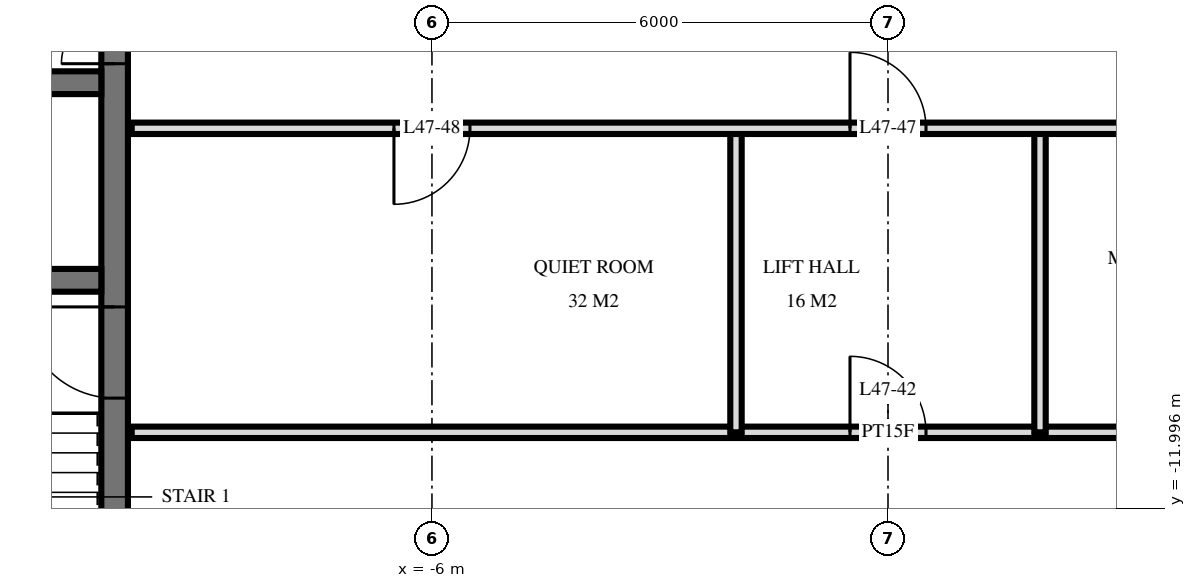
"""IFC4 building model, lengths in metres.
Left out: names, types, materials, properties, quantities, classifications, styles, units other than length and angle.
Written with IfcOpenShell. Run it as: python <this file> out.ifc"""

import sys

from ifc_helpers import new_model, si_unit, direction, frame, frame_2d, origin, place, context, subcontext, project, spatial, rectangle, extrude, element, fill, save


model = new_model("IFC4")
c1 = context("Model", 3, precision=1e-05, world=origin(), true_north=direction((0.0, 1.0)))
c2 = subcontext(c1, "Body", "Model", "MODEL_VIEW")
j1 = project(units=[si_unit("LENGTHUNIT", "METRE"), si_unit("PLANEANGLEUNIT", "RADIAN")], contexts=[c1])
p1 = place(None, origin())
s1 = spatial("IfcSite", under=j1, at=p1, CompositionType="ELEMENT")
p2 = place(p1, origin())
s2 = spatial("IfcBuilding", under=s1, at=p2, CompositionType="ELEMENT")
p3 = place(p2, frame((0.0, 0.0, 183.6)))
s3 = spatial("IfcBuildingStorey", under=s2, at=p3, CompositionType="ELEMENT", Elevation=183.6)
p4 = place(p3, frame((-10.175, -14.55, 0.0), z_axis=(0.0, 0.0, 1.0), x_axis=(0.0, 1.0, 0.0)))
e1 = element("IfcWall", 1, at=p4, inside=s3, PredefinedType="SHEAR", context=c2, shape_type="SweptSolid", body=[
    extrude(rectangle(XDim=14.1, YDim=0.35, at=frame_2d((7.05, 0.0))), origin(), (0.0, 0.0, 1.0), 3.5),
])
p5 = place(p4, frame((8.4, 0.0, 0.0)))
e2 = element("IfcOpeningElement", 2, at=p5, cuts=e1, PredefinedType="OPENING", context=c2, shape_type="SweptSolid", body=[
    extrude(rectangle(XDim=1.4, YDim=2.4, at=frame_2d((0.7, 1.2))), frame((0.0, 0.185, 0.0), z_axis=(0.0, -1.0, 0.0), x_axis=(1.0, 0.0, 0.0)), (0.0, 0.0, 1.0), 0.37),
])
p6 = place(p4, frame((10.0, 0.0, 0.0)))
e3 = element("IfcOpeningElement", 3, at=p6, cuts=e1, PredefinedType="OPENING", context=c2, shape_type="SweptSolid", body=[
    extrude(rectangle(XDim=1.4, YDim=2.4, at=frame_2d((0.7, 1.2))), frame((0.0, 0.185, 0.0), z_axis=(0.0, -1.0, 0.0), x_axis=(1.0, 0.0, 0.0)), (0.0, 0.0, 1.0), 0.37),
])
p7 = place(p4, frame((4.0, 0.0, 0.0)))
e4 = element("IfcOpeningElement", 4, at=p7, cuts=e1, PredefinedType="OPENING", context=c2, shape_type="SweptSolid", body=[
    extrude(rectangle(XDim=1.2, YDim=2.1, at=frame_2d((0.6, 1.05))), frame((0.0, 0.185, 0.0), z_axis=(0.0, -1.0, 0.0), x_axis=(1.0, 0.0, 0.0)), (0.0, 0.0, 1.0), 0.37),
])
p8 = place(p3, frame((-24.05, -6.4, 0.0), z_axis=(0.0, 0.0, 1.0), x_axis=(1.0, 0.0, 0.0)))
e5 = element("IfcWall", 5, at=p8, inside=s3, PredefinedType="SHEAR", context=c2, shape_type="SweptSolid", body=[
    extrude(rectangle(XDim=13.7, YDim=0.3, at=frame_2d((6.85, 0.0))), origin(), (0.0, 0.0, 1.0), 3.5),
])
p9 = place(p8, frame((0.55, 0.0, 0.0)))
e6 = element("IfcOpeningElement", 6, at=p9, cuts=e5, PredefinedType="OPENING", context=c2, shape_type="SweptSolid", body=[
    extrude(rectangle(XDim=1.1, YDim=2.1, at=frame_2d((0.55, 1.05))), frame((0.0, 0.16, 0.0), z_axis=(0.0, -1.0, 0.0), x_axis=(1.0, 0.0, 0.0)), (0.0, 0.0, 1.0), 0.32),
])
p10 = place(p8, frame((5.8, 0.0, 0.0)))
e7 = element("IfcOpeningElement", 7, at=p10, cuts=e5, PredefinedType="OPENING", context=c2, shape_type="SweptSolid", body=[
    extrude(rectangle(XDim=1.1, YDim=2.1, at=frame_2d((0.55, 1.05))), frame((0.0, 0.16, 0.0), z_axis=(0.0, -1.0, 0.0), x_axis=(1.0, 0.0, 0.0)), (0.0, 0.0, 1.0), 0.32),
])
p11 = place(p3, frame((-24.05, -9.0, 0.0), z_axis=(0.0, 0.0, 1.0), x_axis=(1.0, 0.0, 0.0)))
e8 = element("IfcWall", 8, at=p11, inside=s3, PredefinedType="SHEAR", context=c2, shape_type="SweptSolid", body=[
    extrude(rectangle(XDim=13.7, YDim=0.3, at=frame_2d((6.85, 0.0))), origin(), (0.0, 0.0, 1.0), 3.5),
])
p12 = place(p11, frame((8.8, 0.0, 0.0)))
e9 = element("IfcOpeningElement", 9, at=p12, cuts=e8, PredefinedType="OPENING", context=c2, shape_type="SweptSolid", body=[
    extrude(rectangle(XDim=1.1, YDim=2.1, at=frame_2d((0.55, 1.05))), frame((0.0, 0.16, 0.0), z_axis=(0.0, -1.0, 0.0), x_axis=(1.0, 0.0, 0.0)), (0.0, 0.0, 1.0), 0.32),
])
for number, where, z_axis, x_axis in (
    (10, (2.0, -11.0, 0.0), (0.0, 0.0, 1.0), (0.0, 1.0, 0.0)),
    (11, (-2.0, -11.0, 0.0), (0.0, 0.0, 1.0), (0.0, 1.0, 0.0)),
):
    element("IfcWall", number, at=place(p3, frame(where, z_axis=z_axis, x_axis=x_axis)), inside=s3, PredefinedType="PARTITIONING", context=c2, shape_type="SweptSolid", body=[
        extrude(rectangle(XDim=4.0, YDim=0.15, at=frame_2d((2.0, 0.0))), origin(), (0.0, 0.0, 1.0), 3.22),
    ])
p13 = place(p3, frame((-9.95, -11.0, 0.0), z_axis=(0.0, 0.0, 1.0), x_axis=(1.0, 0.0, 0.0)))
e12 = element("IfcWall", 12, at=p13, inside=s3, PredefinedType="PARTITIONING", context=c2, shape_type="SweptSolid", body=[
    extrude(rectangle(XDim=19.9, YDim=0.15, at=frame_2d((9.95, 0.0))), origin(), (0.0, 0.0, 1.0), 3.22),
])
p14 = place(p13, frame((9.45, 0.0, 0.0)))
e13 = element("IfcOpeningElement", 13, at=p14, cuts=e12, PredefinedType="OPENING", context=c2, shape_type="SweptSolid", body=[
    extrude(rectangle(XDim=1.0, YDim=2.1, at=frame_2d((0.5, 1.05))), frame((0.0, 0.085, 0.0), z_axis=(0.0, -1.0, 0.0), x_axis=(1.0, 0.0, 0.0)), (0.0, 0.0, 1.0), 0.17),
])
p15 = place(p13, frame((15.45, 0.0, 0.0)))
e14 = element("IfcOpeningElement", 14, at=p15, cuts=e12, PredefinedType="OPENING", context=c2, shape_type="SweptSolid", body=[
    extrude(rectangle(XDim=1.0, YDim=2.1, at=frame_2d((0.5, 1.05))), frame((0.0, 0.085, 0.0), z_axis=(0.0, -1.0, 0.0), x_axis=(1.0, 0.0, 0.0)), (0.0, 0.0, 1.0), 0.17),
])
p16 = place(p3, frame((-9.95, -7.0, 0.0), z_axis=(0.0, 0.0, 1.0), x_axis=(1.0, 0.0, 0.0)))
e15 = element("IfcWall", 15, at=p16, inside=s3, PredefinedType="PARTITIONING", context=c2, shape_type="SweptSolid", body=[
    extrude(rectangle(XDim=19.9, YDim=0.15, at=frame_2d((9.95, 0.0))), origin(), (0.0, 0.0, 1.0), 3.22),
])
p17 = place(p16, frame((9.45, 0.0, 0.0)))
e16 = element("IfcOpeningElement", 16, at=p17, cuts=e15, PredefinedType="OPENING", context=c2, shape_type="SweptSolid", body=[
    extrude(rectangle(XDim=1.0, YDim=2.1, at=frame_2d((0.5, 1.05))), frame((0.0, 0.085, 0.0), z_axis=(0.0, -1.0, 0.0), x_axis=(1.0, 0.0, 0.0)), (0.0, 0.0, 1.0), 0.17),
])
p18 = place(p16, frame((3.45, 0.0, 0.0)))
e17 = element("IfcOpeningElement", 17, at=p18, cuts=e15, PredefinedType="OPENING", context=c2, shape_type="SweptSolid", body=[
    extrude(rectangle(XDim=1.0, YDim=2.1, at=frame_2d((0.5, 1.05))), frame((0.0, 0.085, 0.0), z_axis=(0.0, -1.0, 0.0), x_axis=(1.0, 0.0, 0.0)), (0.0, 0.0, 1.0), 0.17),
])
p19 = place(p5, origin())
e18 = element("IfcDoor", 18, at=p19, inside=s3, OperationType="DOUBLE_DOOR_SINGLE_SWING", PredefinedType="DOOR", context=c2, shape_type="SweptSolid", body=[
    extrude(rectangle(XDim=1.4, YDim=2.4, at=frame_2d((0.7, 1.2))), frame((0.0, 0.025, 0.0), z_axis=(0.0, -1.0, 0.0), x_axis=(1.0, 0.0, 0.0)), (0.0, 0.0, 1.0), 0.05),
])
fill(e2, e18)
p20 = place(p7, origin())
e19 = element("IfcDoor", 19, at=p20, inside=s3, OperationType="SINGLE_SWING_LEFT", PredefinedType="DOOR", context=c2, shape_type="SweptSolid", body=[
    extrude(rectangle(XDim=1.2, YDim=2.1, at=frame_2d((0.6, 1.05))), frame((0.0, 0.025, 0.0), z_axis=(0.0, -1.0, 0.0), x_axis=(1.0, 0.0, 0.0)), (0.0, 0.0, 1.0), 0.05),
])
fill(e4, e19)
p21 = place(p14, origin())
e20 = element("IfcDoor", 20, at=p21, inside=s3, OperationType="SINGLE_SWING_RIGHT", PredefinedType="DOOR", context=c2, shape_type="SweptSolid", body=[
    extrude(rectangle(XDim=1.0, YDim=2.1, at=frame_2d((0.5, 1.05))), frame((0.0, 0.025, 0.0), z_axis=(0.0, -1.0, 0.0), x_axis=(1.0, 0.0, 0.0)), (0.0, 0.0, 1.0), 0.05),
])
fill(e13, e20)
p22 = place(p17, origin())
e21 = element("IfcDoor", 21, at=p22, inside=s3, OperationType="SINGLE_SWING_RIGHT", PredefinedType="DOOR", context=c2, shape_type="SweptSolid", body=[
    extrude(rectangle(XDim=1.0, YDim=2.1, at=frame_2d((0.5, 1.05))), frame((0.0, 0.025, 0.0), z_axis=(0.0, -1.0, 0.0), x_axis=(1.0, 0.0, 0.0)), (0.0, 0.0, 1.0), 0.05),
])
fill(e16, e21)
p23 = place(p18, frame((0.5, 0.0, 0.0), z_axis=(0.0, 0.0, 1.0), x_axis=(-1.0, 0.0, 0.0)))
e22 = element("IfcDoor", 22, at=p23, inside=s3, OperationType="SINGLE_SWING_LEFT", PredefinedType="DOOR", context=c2, shape_type="SweptSolid", body=[
    extrude(rectangle(XDim=1.0, YDim=2.1, at=frame_2d((0.0, 1.05))), frame((0.0, -0.025, 0.0), z_axis=(0.0, 1.0, 0.0), x_axis=(-1.0, 0.0, 0.0)), (0.0, 0.0, 1.0), 0.05),
])
fill(e17, e22)
save(model, sys.argv[1])
